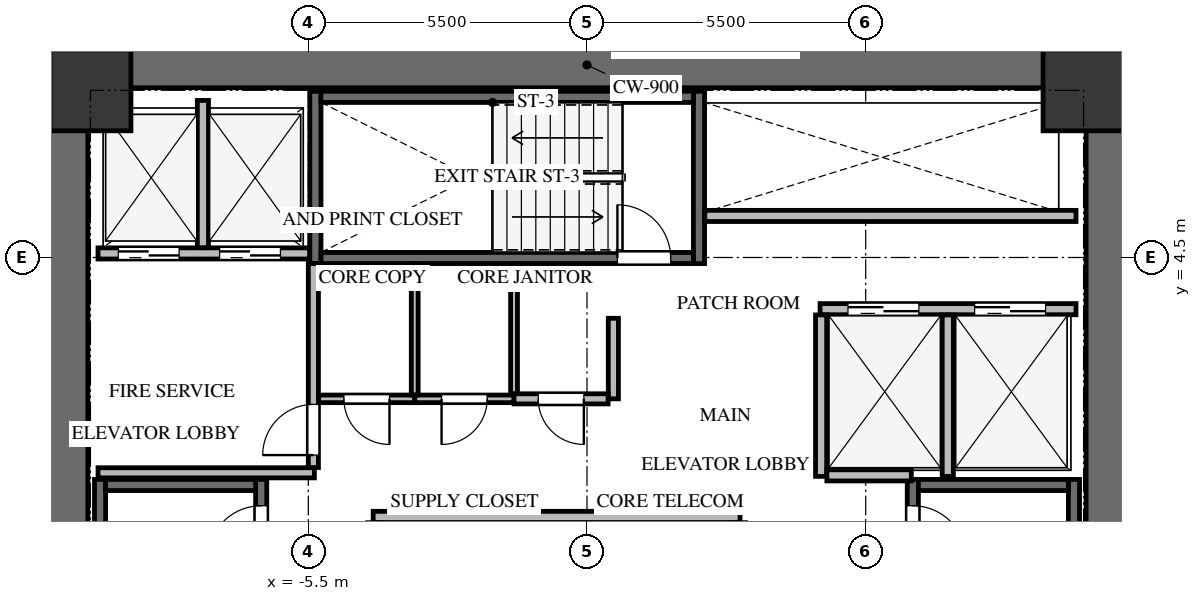
"""IFC4 building model, lengths in metres.
Left out: names, types, materials, properties, quantities, classifications, styles, units other than length and angle.
Written with IfcOpenShell. Run it as: python <this file> out.ifc"""

import sys

from ifc_helpers import new_model, si_unit, direction, frame, frame_2d, origin, origin_2d, place, context, subcontext, project, spatial, rectangle, extrude, source, transform, mapped, element, fill, save


model = new_model("IFC4")
c1 = context("Model", 3, precision=1e-05, world=origin(), true_north=direction((0.0, 1.0)))
c2 = subcontext(c1, "Body", "Model", "MODEL_VIEW")
j1 = project(units=[si_unit("LENGTHUNIT", "METRE"), si_unit("PLANEANGLEUNIT", "RADIAN")], contexts=[c1])
p1 = place(None, origin())
s1 = spatial("IfcSite", under=j1, at=p1, CompositionType="ELEMENT")
p2 = place(p1, origin())
s2 = spatial("IfcBuilding", under=s1, at=p2, CompositionType="ELEMENT")
p3 = place(p2, frame((0.0, 0.0, 65.4)))
s3 = spatial("IfcBuildingStorey", under=s2, at=p3, CompositionType="ELEMENT", Elevation=65.4)
for number, where, z_axis, x_axis in (
    (1, (-10.3, -8.75, 0.0), (0.0, 0.0, 1.0), (0.0, 1.0, 0.0)),
    (2, (10.3, -8.75, 0.0), (0.0, 0.0, 1.0), (0.0, 1.0, 0.0)),
):
    element("IfcWall", number, at=place(p3, frame(where, z_axis=z_axis, x_axis=x_axis)), inside=s3, PredefinedType="SHEAR", context=c2, shape_type="SweptSolid", body=[
        extrude(rectangle(XDim=17.5, YDim=0.9, at=frame_2d((8.75, 0.0))), origin(), (0.0, 0.0, 1.0), 3.3),
    ])
p4 = place(p3, frame((-9.85, 8.3, 0.0), z_axis=(0.0, 0.0, 1.0), x_axis=(1.0, 0.0, 0.0)))
e3 = element("IfcWall", 3, at=p4, inside=s3, PredefinedType="SHEAR", context=c2, shape_type="SweptSolid", body=[
    extrude(rectangle(XDim=19.7, YDim=0.9, at=frame_2d((9.85, 0.0))), origin(), (0.0, 0.0, 1.0), 3.3),
])
p5 = place(p3, frame((-6.43, -7.77, -0.24), z_axis=(0.0, 0.0, 1.0), x_axis=(0.0, 1.0, 0.0)))
e4 = element("IfcWall", 4, at=p5, inside=s3, PredefinedType="SHEAR", context=c2, shape_type="SweptSolid", body=[
    extrude(rectangle(XDim=7.89, YDim=0.22, at=frame_2d((3.945, 0.0))), origin(), (0.0, 0.0, 1.0), 3.3),
])
p6 = place(p5, frame((6.32, 0.0, 0.0)))
e5 = element("IfcOpeningElement", 5, at=p6, cuts=e4, PredefinedType="OPENING", context=c2, shape_type="SweptSolid", body=[
    extrude(rectangle(XDim=1.05, YDim=2.15, at=frame_2d((0.525, 1.075))), frame((0.0, 0.12, 0.0), z_axis=(0.0, -1.0, 0.0), x_axis=(1.0, 0.0, 0.0)), (0.0, 0.0, 1.0), 0.24),
])
p7 = place(p3, frame((-9.61, 0.12, -0.24), z_axis=(0.0, 0.0, 1.0), x_axis=(0.0, -1.0, 0.0)))
e6 = element("IfcWall", 6, at=p7, inside=s3, PredefinedType="SHEAR", context=c2, shape_type="SweptSolid", body=[
    extrude(rectangle(XDim=7.89, YDim=0.22, at=frame_2d((3.945, 0.0))), origin(), (0.0, 0.0, 1.0), 3.3),
])
p8 = place(p3, frame((-6.54, 0.01, -0.24), z_axis=(0.0, 0.0, 1.0), x_axis=(-1.0, 0.0, 0.0)))
e7 = element("IfcWall", 7, at=p8, inside=s3, PredefinedType="SHEAR", context=c2, shape_type="SweptSolid", body=[
    extrude(rectangle(XDim=2.96, YDim=0.22, at=frame_2d((1.48, 0.0))), origin(), (0.0, 0.0, 1.0), 3.3),
])
p9 = place(p3, frame((9.61, -7.77, -0.24), z_axis=(0.0, 0.0, 1.0), x_axis=(0.0, 1.0, 0.0)))
e8 = element("IfcWall", 8, at=p9, inside=s3, PredefinedType="SHEAR", context=c2, shape_type="SweptSolid", body=[
    extrude(rectangle(XDim=7.89, YDim=0.22, at=frame_2d((3.945, 0.0))), origin(), (0.0, 0.0, 1.0), 3.3),
])
p10 = place(p3, frame((6.43, 0.12, -0.24), z_axis=(0.0, 0.0, 1.0), x_axis=(0.0, -1.0, 0.0)))
e9 = element("IfcWall", 9, at=p10, inside=s3, PredefinedType="SHEAR", context=c2, shape_type="SweptSolid", body=[
    extrude(rectangle(XDim=7.89, YDim=0.22, at=frame_2d((3.945, 0.0))), origin(), (0.0, 0.0, 1.0), 3.3),
])
p11 = place(p10, frame((0.52, 0.0, 0.0)))
e10 = element("IfcOpeningElement", 10, at=p11, cuts=e9, PredefinedType="OPENING", context=c2, shape_type="SweptSolid", body=[
    extrude(rectangle(XDim=1.05, YDim=2.15, at=frame_2d((0.525, 1.075))), frame((0.0, 0.12, 0.0), z_axis=(0.0, -1.0, 0.0), x_axis=(1.0, 0.0, 0.0)), (0.0, 0.0, 1.0), 0.24),
])
p12 = place(p3, frame((9.5, 0.01, -0.24), z_axis=(0.0, 0.0, 1.0), x_axis=(-1.0, 0.0, 0.0)))
e11 = element("IfcWall", 11, at=p12, inside=s3, PredefinedType="SHEAR", context=c2, shape_type="SweptSolid", body=[
    extrude(rectangle(XDim=2.96, YDim=0.22, at=frame_2d((1.48, 0.0))), origin(), (0.0, 0.0, 1.0), 3.3),
])
for number, where, z_axis, x_axis in (
    (12, (2.21, 4.38, -0.24), (0.0, 0.0, 1.0), (0.0, 1.0, 0.0)),
    (13, (-5.36, 7.78, -0.24), (0.0, 0.0, 1.0), (0.0, -1.0, 0.0)),
):
    element("IfcWall", number, at=place(p3, frame(where, z_axis=z_axis, x_axis=x_axis)), inside=s3, PredefinedType="SHEAR", context=c2, shape_type="SweptSolid", body=[
        extrude(rectangle(XDim=3.4, YDim=0.22, at=frame_2d((1.7, 0.0))), origin(), (0.0, 0.0, 1.0), 3.3),
    ])
p13 = place(p3, frame((-5.25, 4.49, -0.24), z_axis=(0.0, 0.0, 1.0), x_axis=(1.0, 0.0, 0.0)))
e14 = element("IfcWall", 14, at=p13, inside=s3, PredefinedType="SHEAR", context=c2, shape_type="SweptSolid", body=[
    extrude(rectangle(XDim=7.35, YDim=0.22, at=frame_2d((3.675, 0.0))), origin(), (0.0, 0.0, 1.0), 3.3),
])
p14 = place(p13, frame((5.85, 0.0, 0.0)))
e15 = element("IfcOpeningElement", 15, at=p14, cuts=e14, PredefinedType="OPENING", context=c2, shape_type="SweptSolid", body=[
    extrude(rectangle(XDim=1.05, YDim=2.15, at=frame_2d((0.525, 1.075))), frame((0.0, 0.12, 0.0), z_axis=(0.0, -1.0, 0.0), x_axis=(1.0, 0.0, 0.0)), (0.0, 0.0, 1.0), 0.24),
])
p15 = place(p3, frame((2.1, 7.67, -0.24), z_axis=(0.0, 0.0, 1.0), x_axis=(-1.0, 0.0, 0.0)))
e16 = element("IfcWall", 16, at=p15, inside=s3, PredefinedType="SHEAR", context=c2, shape_type="SweptSolid", body=[
    extrude(rectangle(XDim=7.35, YDim=0.22, at=frame_2d((3.675, 0.0))), origin(), (0.0, 0.0, 1.0), 3.3),
])
m1 = source(origin(), c2, "Body", "SweptSolid", [
    extrude(rectangle(XDim=1.6, YDim=1.6, at=origin_2d()), origin(), (0.0, 0.0, 1.0), 3.3),
])
for number, where, z_axis, x_axis in (
    (17, (9.8, 7.8, -0.24), (0.0, 0.0, 1.0), (1.0, 0.0, 0.0)),
    (18, (-9.8, 7.8, -0.24), (0.0, 0.0, 1.0), (1.0, 0.0, 0.0)),
):
    element("IfcColumn", number, at=place(p3, frame(where, z_axis=z_axis, x_axis=x_axis)), inside=s3, PredefinedType="COLUMN", context=c2, shape_type="MappedRepresentation", body=[
        mapped(m1, transform((0.0, 0.0, 0.0), x_axis=(1.0, 0.0, 0.0), y_axis=(0.0, 1.0, 0.0), z_axis=(0.0, 0.0, 1.0), scale=1.0)),
    ])
p16 = place(p3, frame((-9.65, 4.58, 0.0), z_axis=(0.0, 0.0, 1.0), x_axis=(1.0, 0.0, 0.0)))
e19 = element("IfcWall", 19, at=p16, inside=s3, PredefinedType="SOLIDWALL", context=c2, shape_type="SweptSolid", body=[
    extrude(rectangle(XDim=4.175, YDim=0.22, at=frame_2d((2.087, 0.0))), origin(), (0.0, 0.0, 1.0), 3.045),
])
p17 = place(p16, frame((0.4, 0.0, 0.0)))
e20 = element("IfcOpeningElement", 20, at=p17, cuts=e19, PredefinedType="OPENING", context=c2, shape_type="SweptSolid", body=[
    extrude(rectangle(XDim=1.2, YDim=2.15, at=frame_2d((0.6, 1.075))), frame((0.0, 0.12, 0.0), z_axis=(0.0, -1.0, 0.0), x_axis=(1.0, 0.0, 0.0)), (0.0, 0.0, 1.0), 0.24),
])
p18 = place(p16, frame((2.4, 0.0, 0.0)))
e21 = element("IfcOpeningElement", 21, at=p18, cuts=e19, PredefinedType="OPENING", context=c2, shape_type="SweptSolid", body=[
    extrude(rectangle(XDim=1.2, YDim=2.15, at=frame_2d((0.6, 1.075))), frame((0.0, 0.12, 0.0), z_axis=(0.0, -1.0, 0.0), x_axis=(1.0, 0.0, 0.0)), (0.0, 0.0, 1.0), 0.24),
])
p19 = place(p3, frame((-7.58, 4.694, 0.0), z_axis=(0.0, 0.0, 1.0), x_axis=(0.0, 1.0, 0.0)))
e22 = element("IfcWall", 22, at=p19, inside=s3, PredefinedType="SOLIDWALL", context=c2, shape_type="SweptSolid", body=[
    extrude(rectangle(XDim=2.906, YDim=0.22, at=frame_2d((1.453, 0.0))), origin(), (0.0, 0.0, 1.0), 3.045),
])
p20 = place(p3, frame((-9.65, 0.25, 0.0), z_axis=(0.0, 0.0, 1.0), x_axis=(1.0, 0.0, 0.0)))
e23 = element("IfcWall", 23, at=p20, inside=s3, PredefinedType="SOLIDWALL", context=c2, shape_type="SweptSolid", body=[
    extrude(rectangle(XDim=4.27, YDim=0.2, at=frame_2d((2.135, 0.0))), origin(), (0.0, 0.0, 1.0), 3.045),
])
p21 = place(p3, frame((-5.4, 0.354, 0.0), z_axis=(0.0, 0.0, 1.0), x_axis=(0.0, 1.0, 0.0)))
e24 = element("IfcWall", 24, at=p21, inside=s3, PredefinedType="SOLIDWALL", context=c2, shape_type="SweptSolid", body=[
    extrude(rectangle(XDim=4.026, YDim=0.2, at=frame_2d((2.013, 0.0))), origin(), (0.0, 0.0, 1.0), 3.045),
])
p22 = place(p21, frame((0.246, 0.0, 0.0)))
e25 = element("IfcOpeningElement", 25, at=p22, cuts=e24, PredefinedType="OPENING", context=c2, shape_type="SweptSolid", body=[
    extrude(rectangle(XDim=1.0, YDim=2.15, at=frame_2d((0.5, 1.075))), frame((0.0, 0.11, 0.0), z_axis=(0.0, -1.0, 0.0), x_axis=(1.0, 0.0, 0.0)), (0.0, 0.0, 1.0), 0.22),
])
p23 = place(p3, frame((4.6, 3.48, 0.0), z_axis=(0.0, 0.0, 1.0), x_axis=(1.0, 0.0, 0.0)))
e26 = element("IfcWall", 26, at=p23, inside=s3, PredefinedType="SOLIDWALL", context=c2, shape_type="SweptSolid", body=[
    extrude(rectangle(XDim=5.05, YDim=0.22, at=frame_2d((2.525, 0.0))), origin(), (0.0, 0.0, 1.0), 3.045),
])
p24 = place(p23, frame((0.55, 0.0, 0.0)))
e27 = element("IfcOpeningElement", 27, at=p24, cuts=e26, PredefinedType="OPENING", context=c2, shape_type="SweptSolid", body=[
    extrude(rectangle(XDim=1.4, YDim=2.15, at=frame_2d((0.7, 1.075))), frame((0.0, 0.12, 0.0), z_axis=(0.0, -1.0, 0.0), x_axis=(1.0, 0.0, 0.0)), (0.0, 0.0, 1.0), 0.24),
])
p25 = place(p23, frame((3.05, 0.0, 0.0)))
e28 = element("IfcOpeningElement", 28, at=p25, cuts=e26, PredefinedType="OPENING", context=c2, shape_type="SweptSolid", body=[
    extrude(rectangle(XDim=1.4, YDim=2.15, at=frame_2d((0.7, 1.075))), frame((0.0, 0.12, 0.0), z_axis=(0.0, -1.0, 0.0), x_axis=(1.0, 0.0, 0.0)), (0.0, 0.0, 1.0), 0.24),
])
for number, where, z_axis, x_axis in (
    (29, (4.62, 0.18, 0.0), (0.0, 0.0, 1.0), (0.0, 1.0, 0.0)),
    (30, (7.12, 0.18, 0.0), (0.0, 0.0, 1.0), (0.0, 1.0, 0.0)),
):
    element("IfcWall", number, at=place(p3, frame(where, z_axis=z_axis, x_axis=x_axis)), inside=s3, PredefinedType="SOLIDWALL", context=c2, shape_type="SweptSolid", body=[
        extrude(rectangle(XDim=3.186, YDim=0.22, at=frame_2d((1.593, 0.0))), origin(), (0.0, 0.0, 1.0), 3.045),
    ])
p26 = place(p3, frame((4.734, 0.2, 0.0), z_axis=(0.0, 0.0, 1.0), x_axis=(1.0, 0.0, 0.0)))
e31 = element("IfcWall", 31, at=p26, inside=s3, PredefinedType="SOLIDWALL", context=c2, shape_type="SweptSolid", body=[
    extrude(rectangle(XDim=1.666, YDim=0.22, at=frame_2d((0.833, 0.0))), origin(), (0.0, 0.0, 1.0), 3.045),
])
p27 = place(p3, frame((-4.22, -0.62, 0.0), z_axis=(0.0, 0.0, 1.0), x_axis=(1.0, 0.0, 0.0)))
e32 = element("IfcWall", 32, at=p27, inside=s3, PredefinedType="SOLIDWALL", context=c2, shape_type="SweptSolid", body=[
    extrude(rectangle(XDim=7.24, YDim=0.22, at=frame_2d((3.62, 0.0))), origin(), (0.0, 0.0, 1.0), 3.045),
])
p28 = place(p3, frame((2.325, 5.32, 0.0), z_axis=(0.0, 0.0, 1.0), x_axis=(1.0, 0.0, 0.0)))
e33 = element("IfcWall", 33, at=p28, inside=s3, PredefinedType="SOLIDWALL", context=c2, shape_type="SweptSolid", body=[
    extrude(rectangle(XDim=7.325, YDim=0.22, at=frame_2d((3.663, 0.0))), origin(), (0.0, 0.0, 1.0), 3.045),
])
p29 = place(p3, frame((-3.4, 1.71, 0.0), z_axis=(0.0, 0.0, 1.0), x_axis=(-1.0, 0.0, 0.0)))
e34 = element("IfcWall", 34, at=p29, inside=s3, PredefinedType="PARTITIONING", context=c2, shape_type="SweptSolid", body=[
    extrude(rectangle(XDim=1.896, YDim=0.15, at=frame_2d((0.948, 0.0))), origin(), (0.0, 0.0, 1.0), 3.045),
])
p30 = place(p29, frame((0.498, 0.0, 0.0)))
e35 = element("IfcOpeningElement", 35, at=p30, cuts=e34, PredefinedType="OPENING", context=c2, shape_type="SweptSolid", body=[
    extrude(rectangle(XDim=0.9, YDim=2.05, at=frame_2d((0.45, 1.025))), frame((0.0, 0.085, 0.0), z_axis=(0.0, -1.0, 0.0), x_axis=(1.0, 0.0, 0.0)), (0.0, 0.0, 1.0), 0.17),
])
p31 = place(p3, frame((-1.44, 1.71, 0.0), z_axis=(0.0, 0.0, 1.0), x_axis=(-1.0, 0.0, 0.0)))
e36 = element("IfcWall", 36, at=p31, inside=s3, PredefinedType="PARTITIONING", context=c2, shape_type="SweptSolid", body=[
    extrude(rectangle(XDim=1.96, YDim=0.15, at=frame_2d((0.98, 0.0))), origin(), (0.0, 0.0, 1.0), 3.045),
])
p32 = place(p31, frame((0.53, 0.0, 0.0)))
e37 = element("IfcOpeningElement", 37, at=p32, cuts=e36, PredefinedType="OPENING", context=c2, shape_type="SweptSolid", body=[
    extrude(rectangle(XDim=0.9, YDim=2.05, at=frame_2d((0.45, 1.025))), frame((0.0, 0.085, 0.0), z_axis=(0.0, -1.0, 0.0), x_axis=(1.0, 0.0, 0.0)), (0.0, 0.0, 1.0), 0.17),
])
p33 = place(p3, frame((0.52, 3.3, 0.0), z_axis=(0.0, 0.0, 1.0), x_axis=(0.0, -1.0, 0.0)))
e38 = element("IfcWall", 38, at=p33, inside=s3, PredefinedType="SOLIDWALL", context=c2, shape_type="SweptSolid", body=[
    extrude(rectangle(XDim=1.59, YDim=0.2, at=frame_2d((0.795, 0.0))), origin(), (0.0, 0.0, 1.0), 3.045),
])
p34 = place(p3, frame((0.416, 1.71, 0.0), z_axis=(0.0, 0.0, 1.0), x_axis=(-1.0, 0.0, 0.0)))
e39 = element("IfcWall", 39, at=p34, inside=s3, PredefinedType="SOLIDWALL", context=c2, shape_type="SweptSolid", body=[
    extrude(rectangle(XDim=1.856, YDim=0.2, at=frame_2d((0.928, 0.0))), origin(), (0.0, 0.0, 1.0), 3.045),
])
p35 = place(p34, frame((0.478, 0.0, 0.0)))
e40 = element("IfcOpeningElement", 40, at=p35, cuts=e39, PredefinedType="OPENING", context=c2, shape_type="SweptSolid", body=[
    extrude(rectangle(XDim=0.9, YDim=2.05, at=frame_2d((0.45, 1.025))), frame((0.0, 0.11, 0.0), z_axis=(0.0, -1.0, 0.0), x_axis=(1.0, 0.0, 0.0)), (0.0, 0.0, 1.0), 0.22),
])
p36 = place(p3, frame((-3.4, 4.375, 0.0), z_axis=(0.0, 0.0, 1.0), x_axis=(0.0, -1.0, 0.0)))
e41 = element("IfcWall", 41, at=p36, inside=s3, PredefinedType="PARTITIONING", context=c2, shape_type="SweptSolid", body=[
    extrude(rectangle(XDim=2.586, YDim=0.135, at=frame_2d((1.293, 0.0))), origin(), (0.0, 0.0, 1.0), 3.045),
])
p37 = place(p3, frame((-1.44, 4.375, 0.0), z_axis=(0.0, 0.0, 1.0), x_axis=(0.0, -1.0, 0.0)))
e42 = element("IfcWall", 42, at=p37, inside=s3, PredefinedType="PARTITIONING", context=c2, shape_type="SweptSolid", body=[
    extrude(rectangle(XDim=2.561, YDim=0.135, at=frame_2d((1.281, 0.0))), origin(), (0.0, 0.0, 1.0), 3.045),
])
m2 = source(origin(), c2, "Body", "SweptSolid", [
    extrude(rectangle(XDim=1.05, YDim=2.15, at=frame_2d((0.525, 1.075))), frame((0.0, 0.025, 0.0), z_axis=(0.0, -1.0, 0.0), x_axis=(1.0, 0.0, 0.0)), (0.0, 0.0, 1.0), 0.05),
])
p38 = place(p6, origin())
e43 = element("IfcDoor", 43, at=p38, inside=s3, OperationType="SINGLE_SWING_LEFT", PredefinedType="DOOR", context=c2, shape_type="MappedRepresentation", body=[
    mapped(m2, transform((0.0, 0.0, 0.0), x_axis=(1.0, 0.0, 0.0), y_axis=(0.0, 1.0, 0.0), z_axis=(0.0, 0.0, 1.0), scale=1.0)),
])
fill(e5, e43)
m3 = source(origin(), c2, "Body", "SweptSolid", [
    extrude(rectangle(XDim=1.05, YDim=2.15, at=frame_2d((0.525, 1.075))), frame((0.0, 0.025, 0.0), z_axis=(0.0, -1.0, 0.0), x_axis=(1.0, 0.0, 0.0)), (0.0, 0.0, 1.0), 0.05),
])
p39 = place(p11, origin())
e44 = element("IfcDoor", 44, at=p39, inside=s3, OperationType="SINGLE_SWING_RIGHT", PredefinedType="DOOR", context=c2, shape_type="MappedRepresentation", body=[
    mapped(m3, transform((0.0, 0.0, 0.0), x_axis=(1.0, 0.0, 0.0), y_axis=(0.0, 1.0, 0.0), z_axis=(0.0, 0.0, 1.0), scale=1.0)),
])
fill(e10, e44)
p40 = place(p14, origin())
e45 = element("IfcDoor", 45, at=p40, inside=s3, OperationType="SINGLE_SWING_LEFT", PredefinedType="DOOR", context=c2, shape_type="MappedRepresentation", body=[
    mapped(m2, transform((0.0, 0.0, 0.0), x_axis=(1.0, 0.0, 0.0), y_axis=(0.0, 1.0, 0.0), z_axis=(0.0, 0.0, 1.0), scale=1.0)),
])
fill(e15, e45)
m4 = source(origin(), c2, "Body", "SweptSolid", [
    extrude(rectangle(XDim=1.2, YDim=2.15, at=frame_2d((0.6, 1.075))), frame((0.0, 0.025, 0.0), z_axis=(0.0, -1.0, 0.0), x_axis=(1.0, 0.0, 0.0)), (0.0, 0.0, 1.0), 0.05),
])
p41 = place(p17, origin())
e46 = element("IfcDoor", 46, at=p41, inside=s3, OperationType="DOUBLE_DOOR_SLIDING", PredefinedType="DOOR", context=c2, shape_type="MappedRepresentation", body=[
    mapped(m4, transform((0.0, 0.0, 0.0), x_axis=(1.0, 0.0, 0.0), y_axis=(0.0, 1.0, 0.0), z_axis=(0.0, 0.0, 1.0), scale=1.0)),
])
fill(e20, e46)
p42 = place(p18, origin())
e47 = element("IfcDoor", 47, at=p42, inside=s3, OperationType="DOUBLE_DOOR_SLIDING", PredefinedType="DOOR", context=c2, shape_type="MappedRepresentation", body=[
    mapped(m4, transform((0.0, 0.0, 0.0), x_axis=(1.0, 0.0, 0.0), y_axis=(0.0, 1.0, 0.0), z_axis=(0.0, 0.0, 1.0), scale=1.0)),
])
fill(e21, e47)
m5 = source(origin(), c2, "Body", "SweptSolid", [
    extrude(rectangle(XDim=1.0, YDim=2.15, at=frame_2d((0.5, 1.075))), frame((0.0, 0.025, 0.0), z_axis=(0.0, -1.0, 0.0), x_axis=(1.0, 0.0, 0.0)), (0.0, 0.0, 1.0), 0.05),
])
p43 = place(p22, origin())
e48 = element("IfcDoor", 48, at=p43, inside=s3, OperationType="SINGLE_SWING_LEFT", PredefinedType="DOOR", context=c2, shape_type="MappedRepresentation", body=[
    mapped(m5, transform((0.0, 0.0, 0.0), x_axis=(1.0, 0.0, 0.0), y_axis=(0.0, 1.0, 0.0), z_axis=(0.0, 0.0, 1.0), scale=1.0)),
])
fill(e25, e48)
m6 = source(origin(), c2, "Body", "SweptSolid", [
    extrude(rectangle(XDim=1.4, YDim=2.15, at=frame_2d((0.7, 1.075))), frame((0.0, 0.025, 0.0), z_axis=(0.0, -1.0, 0.0), x_axis=(1.0, 0.0, 0.0)), (0.0, 0.0, 1.0), 0.05),
])
p44 = place(p24, origin())
e49 = element("IfcDoor", 49, at=p44, inside=s3, OperationType="DOUBLE_DOOR_SLIDING", PredefinedType="DOOR", context=c2, shape_type="MappedRepresentation", body=[
    mapped(m6, transform((0.0, 0.0, 0.0), x_axis=(1.0, 0.0, 0.0), y_axis=(0.0, 1.0, 0.0), z_axis=(0.0, 0.0, 1.0), scale=1.0)),
])
fill(e27, e49)
p45 = place(p25, origin())
e50 = element("IfcDoor", 50, at=p45, inside=s3, OperationType="DOUBLE_DOOR_SLIDING", PredefinedType="DOOR", context=c2, shape_type="MappedRepresentation", body=[
    mapped(m6, transform((0.0, 0.0, 0.0), x_axis=(1.0, 0.0, 0.0), y_axis=(0.0, 1.0, 0.0), z_axis=(0.0, 0.0, 1.0), scale=1.0)),
])
fill(e28, e50)
m7 = source(origin(), c2, "Body", "SweptSolid", [
    extrude(rectangle(XDim=0.9, YDim=2.05, at=frame_2d((0.45, 1.025))), frame((0.0, 0.025, 0.0), z_axis=(0.0, -1.0, 0.0), x_axis=(1.0, 0.0, 0.0)), (0.0, 0.0, 1.0), 0.05),
])
p46 = place(p30, origin())
e51 = element("IfcDoor", 51, at=p46, inside=s3, OperationType="SINGLE_SWING_LEFT", PredefinedType="DOOR", context=c2, shape_type="MappedRepresentation", body=[
    mapped(m7, transform((0.0, 0.0, 0.0), x_axis=(1.0, 0.0, 0.0), y_axis=(0.0, 1.0, 0.0), z_axis=(0.0, 0.0, 1.0), scale=1.0)),
])
fill(e35, e51)
m8 = source(origin(), c2, "Body", "SweptSolid", [
    extrude(rectangle(XDim=0.9, YDim=2.05, at=frame_2d((0.45, 1.025))), frame((0.0, 0.025, 0.0), z_axis=(0.0, -1.0, 0.0), x_axis=(1.0, 0.0, 0.0)), (0.0, 0.0, 1.0), 0.05),
])
p47 = place(p32, origin())
e52 = element("IfcDoor", 52, at=p47, inside=s3, OperationType="SINGLE_SWING_RIGHT", PredefinedType="DOOR", context=c2, shape_type="MappedRepresentation", body=[
    mapped(m8, transform((0.0, 0.0, 0.0), x_axis=(1.0, 0.0, 0.0), y_axis=(0.0, 1.0, 0.0), z_axis=(0.0, 0.0, 1.0), scale=1.0)),
])
fill(e37, e52)
p48 = place(p35, origin())
e53 = element("IfcDoor", 53, at=p48, inside=s3, OperationType="SINGLE_SWING_LEFT", PredefinedType="DOOR", context=c2, shape_type="MappedRepresentation", body=[
    mapped(m7, transform((0.0, 0.0, 0.0), x_axis=(1.0, 0.0, 0.0), y_axis=(0.0, 1.0, 0.0), z_axis=(0.0, 0.0, 1.0), scale=1.0)),
])
fill(e40, e53)
save(model, sys.argv[1])
